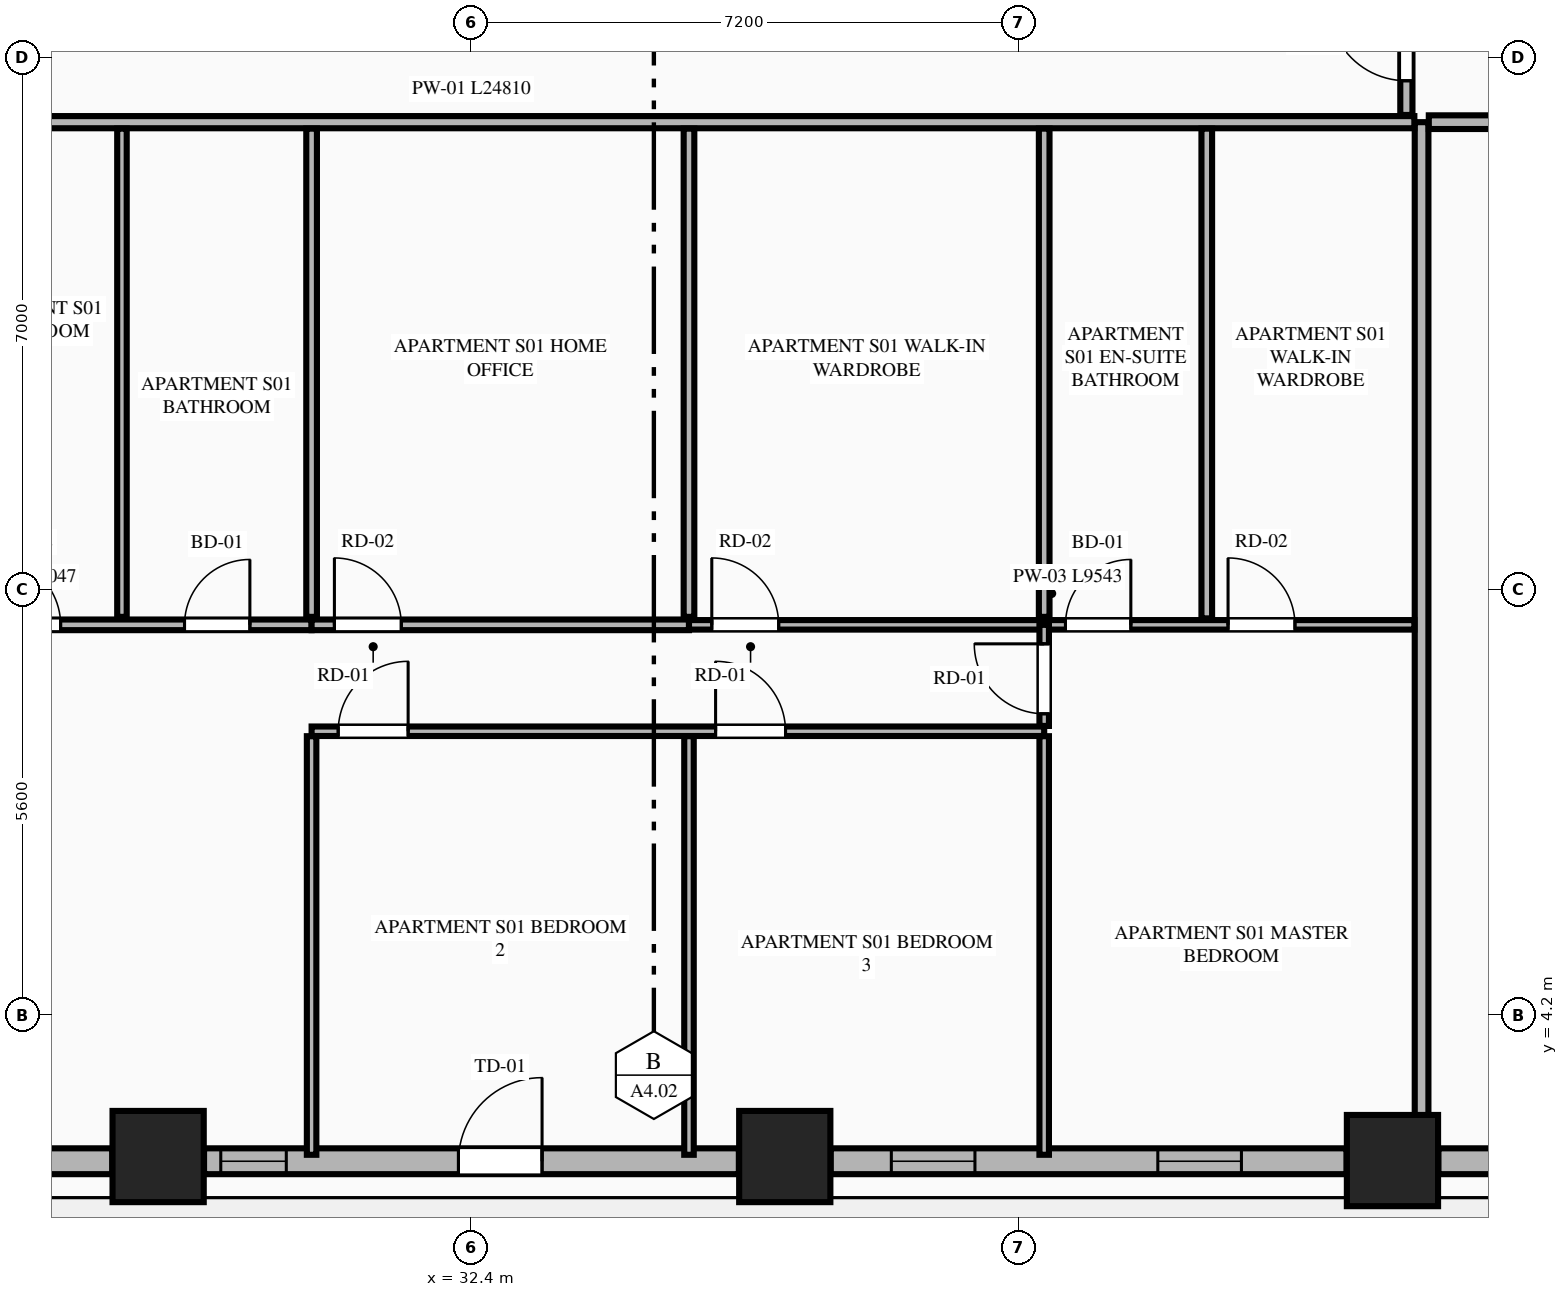
"""IFC4 building model, lengths in metres.
Left out: names, types, materials, properties, quantities, classifications, styles, units other than length and angle.
Written with IfcOpenShell. Run it as: python <this file> out.ifc"""

import sys

from ifc_helpers import new_model, si_unit, direction, frame, frame_2d, origin, origin_2d, place, context, subcontext, project, spatial, rectangle, extrude, element, fill, save


model = new_model("IFC4")
c1 = context("Model", 3, precision=1e-05, world=origin(), true_north=direction((0.0, 1.0)))
c2 = subcontext(c1, "Body", "Model", "MODEL_VIEW")
j1 = project(units=[si_unit("LENGTHUNIT", "METRE"), si_unit("PLANEANGLEUNIT", "RADIAN")], contexts=[c1])
p1 = place(None, origin())
s1 = spatial("IfcSite", under=j1, at=p1, CompositionType="ELEMENT")
p2 = place(p1, origin())
s2 = spatial("IfcBuilding", under=s1, at=p2, CompositionType="ELEMENT")
p3 = place(p2, frame((0.0, 0.0, 71.05)))
s3 = spatial("IfcBuildingStorey", under=s2, at=p3, CompositionType="ELEMENT", Elevation=71.05)
for number, where, z_axis, x_axis in (
    (1, (28.278, 2.342, 0.0), (0.0, 0.0, 1.0), (1.0, 0.0, 0.0)),
    (2, (36.522, 2.342, 0.0), (0.0, 0.0, 1.0), (1.0, 0.0, 0.0)),
    (3, (44.517, 2.289, 0.0), (0.0, 0.0, 1.0), (1.0, 0.0, 0.0)),
):
    element("IfcColumn", number, at=place(p3, frame(where, z_axis=z_axis, x_axis=x_axis)), inside=s3, PredefinedType="COLUMN", context=c2, shape_type="SweptSolid", body=[
        extrude(rectangle(XDim=1.2, YDim=1.2, at=origin_2d()), origin(), (0.0, 0.0, 1.0), 3.55),
    ])
p4 = place(p3, frame((20.887, 2.28, 0.0), z_axis=(0.0, 0.0, 1.0), x_axis=(1.0, 0.0, 0.0)))
e4 = element("IfcWall", 4, at=p4, inside=s3, PredefinedType="STANDARD", context=c2, shape_type="SweptSolid", body=[
    extrude(rectangle(XDim=6.787, YDim=0.34, at=frame_2d((3.394, 0.0))), origin(), (0.0, 0.0, 1.0), 2.652),
])
p5 = place(p4, frame((2.843, 0.0, 0.75)))
e5 = element("IfcOpeningElement", 5, at=p5, cuts=e4, PredefinedType="OPENING", context=c2, shape_type="SweptSolid", body=[
    extrude(rectangle(XDim=1.1, YDim=1.752, at=frame_2d((0.55, 0.876))), frame((0.0, 0.18, 0.0), z_axis=(0.0, -1.0, 0.0), x_axis=(1.0, 0.0, 0.0)), (0.0, 0.0, 1.0), 0.36),
])
p6 = place(p3, frame((28.882, 2.28, 0.0), z_axis=(0.0, 0.0, 1.0), x_axis=(1.0, 0.0, 0.0)))
e6 = element("IfcWall", 6, at=p6, inside=s3, PredefinedType="STANDARD", context=c2, shape_type="SweptSolid", body=[
    extrude(rectangle(XDim=7.036, YDim=0.34, at=frame_2d((3.518, 0.0))), origin(), (0.0, 0.0, 1.0), 2.652),
])
p7 = place(p6, frame((3.347, 0.0, 0.0)))
e7 = element("IfcOpeningElement", 7, at=p7, cuts=e6, PredefinedType="OPENING", context=c2, shape_type="SweptSolid", body=[
    extrude(rectangle(XDim=1.1, YDim=2.25, at=frame_2d((0.55, 1.125))), frame((0.0, 0.18, 0.0), z_axis=(0.0, -1.0, 0.0), x_axis=(1.0, 0.0, 0.0)), (0.0, 0.0, 1.0), 0.36),
])
p8 = place(p6, frame((0.22, 0.0, 0.75)))
e8 = element("IfcOpeningElement", 8, at=p8, cuts=e6, PredefinedType="OPENING", context=c2, shape_type="SweptSolid", body=[
    extrude(rectangle(XDim=0.862, YDim=1.752, at=frame_2d((0.431, 0.876))), frame((0.0, 0.18, 0.0), z_axis=(0.0, -1.0, 0.0), x_axis=(1.0, 0.0, 0.0)), (0.0, 0.0, 1.0), 0.36),
])
p9 = place(p3, frame((37.126, 2.28, 0.0), z_axis=(0.0, 0.0, 1.0), x_axis=(1.0, 0.0, 0.0)))
e9 = element("IfcWall", 9, at=p9, inside=s3, PredefinedType="STANDARD", context=c2, shape_type="SweptSolid", body=[
    extrude(rectangle(XDim=6.787, YDim=0.34, at=frame_2d((3.394, 0.0))), origin(), (0.0, 0.0, 1.0), 2.652),
])
p10 = place(p9, frame((0.798, 0.0, 0.75)))
e10 = element("IfcOpeningElement", 10, at=p10, cuts=e9, PredefinedType="OPENING", context=c2, shape_type="SweptSolid", body=[
    extrude(rectangle(XDim=1.1, YDim=1.752, at=frame_2d((0.55, 0.876))), frame((0.0, 0.18, 0.0), z_axis=(0.0, -1.0, 0.0), x_axis=(1.0, 0.0, 0.0)), (0.0, 0.0, 1.0), 0.36),
])
p11 = place(p9, frame((4.304, 0.0, 0.75)))
e11 = element("IfcOpeningElement", 11, at=p11, cuts=e9, PredefinedType="OPENING", context=c2, shape_type="SweptSolid", body=[
    extrude(rectangle(XDim=1.1, YDim=1.752, at=frame_2d((0.55, 0.876))), frame((0.0, 0.18, 0.0), z_axis=(0.0, -1.0, 0.0), x_axis=(1.0, 0.0, 0.0)), (0.0, 0.0, 1.0), 0.36),
])
p12 = place(p3, frame((45.121, 2.28, 0.0), z_axis=(0.0, 0.0, 1.0), x_axis=(1.0, 0.0, 0.0)))
e12 = element("IfcWall", 12, at=p12, inside=s3, PredefinedType="STANDARD", context=c2, shape_type="SweptSolid", body=[
    extrude(rectangle(XDim=1.245, YDim=0.34, at=frame_2d((0.623, 0.0))), origin(), (0.0, 0.0, 1.0), 3.27),
])
p13 = place(p3, frame((44.9, 2.455, 0.0), z_axis=(0.0, 0.0, 1.0), x_axis=(0.0, 1.0, 0.0)))
e13 = element("IfcWall", 13, at=p13, inside=s3, PredefinedType="PARTITIONING", context=c2, shape_type="SweptSolid", body=[
    extrude(rectangle(XDim=13.495, YDim=0.18, at=frame_2d((6.748, 0.0))), origin(), (0.0, 0.0, 1.0), 3.27),
])
p14 = place(p3, frame((19.995, 15.95, 0.0), z_axis=(0.0, 0.0, 1.0), x_axis=(1.0, 0.0, 0.0)))
e14 = element("IfcWall", 14, at=p14, inside=s3, PredefinedType="PARTITIONING", context=c2, shape_type="SweptSolid", body=[
    extrude(rectangle(XDim=24.81, YDim=0.16, at=frame_2d((12.405, 0.0))), origin(), (0.0, 0.0, 1.0), 3.27),
])
p15 = place(p14, frame((0.705, 0.0, 0.0)))
e15 = element("IfcOpeningElement", 15, at=p15, cuts=e14, PredefinedType="OPENING", context=c2, shape_type="SweptSolid", body=[
    extrude(rectangle(XDim=1.35, YDim=2.35, at=frame_2d((0.675, 1.175))), frame((0.0, 0.09, 0.0), z_axis=(0.0, -1.0, 0.0), x_axis=(1.0, 0.0, 0.0)), (0.0, 0.0, 1.0), 0.18),
])
p16 = place(p3, frame((22.25, 9.337, 0.0), z_axis=(0.0, 0.0, 1.0), x_axis=(1.0, 0.0, 0.0)))
e16 = element("IfcWall", 16, at=p16, inside=s3, PredefinedType="PLUMBINGWALL", context=c2, shape_type="SweptSolid", body=[
    extrude(rectangle(XDim=8.047, YDim=0.14, at=frame_2d((4.023, 0.0))), origin(), (0.0, 0.0, 1.0), 3.27),
])
p17 = place(p16, frame((6.375, 0.0, 0.0)))
e17 = element("IfcOpeningElement", 17, at=p17, cuts=e16, PredefinedType="OPENING", context=c2, shape_type="SweptSolid", body=[
    extrude(rectangle(XDim=0.86, YDim=2.1, at=frame_2d((0.43, 1.05))), frame((0.0, 0.08, 0.0), z_axis=(0.0, -1.0, 0.0), x_axis=(1.0, 0.0, 0.0)), (0.0, 0.0, 1.0), 0.16),
])
p18 = place(p16, frame((0.26, 0.0, 0.0)))
e18 = element("IfcOpeningElement", 18, at=p18, cuts=e16, PredefinedType="OPENING", context=c2, shape_type="SweptSolid", body=[
    extrude(rectangle(XDim=0.88, YDim=2.15, at=frame_2d((0.44, 1.075))), frame((0.0, 0.08, 0.0), z_axis=(0.0, -1.0, 0.0), x_axis=(1.0, 0.0, 0.0)), (0.0, 0.0, 1.0), 0.16),
])
p19 = place(p16, frame((3.865, 0.0, 0.0)))
e19 = element("IfcOpeningElement", 19, at=p19, cuts=e16, PredefinedType="OPENING", context=c2, shape_type="SweptSolid", body=[
    extrude(rectangle(XDim=0.88, YDim=2.15, at=frame_2d((0.44, 1.075))), frame((0.0, 0.08, 0.0), z_axis=(0.0, -1.0, 0.0), x_axis=(1.0, 0.0, 0.0)), (0.0, 0.0, 1.0), 0.16),
])
p20 = place(p3, frame((30.297, 9.337, 0.0), z_axis=(0.0, 0.0, 1.0), x_axis=(1.0, 0.0, 0.0)))
e20 = element("IfcWall", 20, at=p20, inside=s3, PredefinedType="PLUMBINGWALL", context=c2, shape_type="SweptSolid", body=[
    extrude(rectangle(XDim=4.965, YDim=0.14, at=frame_2d((2.482, 0.0))), origin(), (0.0, 0.0, 1.0), 3.27),
])
p21 = place(p20, frame((0.3, 0.0, 0.0)))
e21 = element("IfcOpeningElement", 21, at=p21, cuts=e20, PredefinedType="OPENING", context=c2, shape_type="SweptSolid", body=[
    extrude(rectangle(XDim=0.88, YDim=2.15, at=frame_2d((0.44, 1.075))), frame((0.0, 0.08, 0.0), z_axis=(0.0, -1.0, 0.0), x_axis=(1.0, 0.0, 0.0)), (0.0, 0.0, 1.0), 0.16),
])
p22 = place(p3, frame((35.262, 9.337, 0.0), z_axis=(0.0, 0.0, 1.0), x_axis=(1.0, 0.0, 0.0)))
e22 = element("IfcWall", 22, at=p22, inside=s3, PredefinedType="PARTITIONING", context=c2, shape_type="SweptSolid", body=[
    extrude(rectangle(XDim=9.543, YDim=0.125, at=frame_2d((4.771, 0.0))), origin(), (0.0, 0.0, 1.0), 3.27),
])
p23 = place(p22, frame((4.953, 0.0, 0.0)))
e23 = element("IfcOpeningElement", 23, at=p23, cuts=e22, PredefinedType="OPENING", context=c2, shape_type="SweptSolid", body=[
    extrude(rectangle(XDim=0.86, YDim=2.1, at=frame_2d((0.43, 1.05))), frame((0.0, 0.073, 0.0), z_axis=(0.0, -1.0, 0.0), x_axis=(1.0, 0.0, 0.0)), (0.0, 0.0, 1.0), 0.145),
])
p24 = place(p22, frame((7.092, 0.0, 0.0)))
e24 = element("IfcOpeningElement", 24, at=p24, cuts=e22, PredefinedType="OPENING", context=c2, shape_type="SweptSolid", body=[
    extrude(rectangle(XDim=0.88, YDim=2.15, at=frame_2d((0.44, 1.075))), frame((0.0, 0.073, 0.0), z_axis=(0.0, -1.0, 0.0), x_axis=(1.0, 0.0, 0.0)), (0.0, 0.0, 1.0), 0.145),
])
p25 = place(p22, frame((0.3, 0.0, 0.0)))
e25 = element("IfcOpeningElement", 25, at=p25, cuts=e22, PredefinedType="OPENING", context=c2, shape_type="SweptSolid", body=[
    extrude(rectangle(XDim=0.88, YDim=2.15, at=frame_2d((0.44, 1.075))), frame((0.0, 0.073, 0.0), z_axis=(0.0, -1.0, 0.0), x_axis=(1.0, 0.0, 0.0)), (0.0, 0.0, 1.0), 0.145),
])
p26 = place(p3, frame((27.802, 9.442, 0.0), z_axis=(0.0, 0.0, 1.0), x_axis=(0.0, 1.0, 0.0)))
e26 = element("IfcWall", 26, at=p26, inside=s3, PredefinedType="PARTITIONING", context=c2, shape_type="SweptSolid", body=[
    extrude(rectangle(XDim=6.423, YDim=0.125, at=frame_2d((3.211, 0.0))), origin(), (0.0, 0.0, 1.0), 3.27),
])
p27 = place(p3, frame((30.297, 2.365, 0.0), z_axis=(0.0, 0.0, 1.0), x_axis=(0.0, 1.0, 0.0)))
e27 = element("IfcWall", 27, at=p27, inside=s3, PredefinedType="PARTITIONING", context=c2, shape_type="SweptSolid", body=[
    extrude(rectangle(XDim=5.507, YDim=0.125, at=frame_2d((2.753, 0.0))), origin(), (0.0, 0.0, 1.0), 3.27),
])
p28 = place(p3, frame((30.297, 7.937, 0.0), z_axis=(0.0, 0.0, 1.0), x_axis=(1.0, 0.0, 0.0)))
e28 = element("IfcWall", 28, at=p28, inside=s3, PredefinedType="PARTITIONING", context=c2, shape_type="SweptSolid", body=[
    extrude(rectangle(XDim=9.638, YDim=0.125, at=frame_2d((4.819, 0.0))), origin(), (0.0, 0.0, 1.0), 3.27),
])
p29 = place(p28, frame((0.35, 0.0, 0.0)))
e29 = element("IfcOpeningElement", 29, at=p29, cuts=e28, PredefinedType="OPENING", context=c2, shape_type="SweptSolid", body=[
    extrude(rectangle(XDim=0.92, YDim=2.15, at=frame_2d((0.46, 1.075))), frame((0.0, 0.073, 0.0), z_axis=(0.0, -1.0, 0.0), x_axis=(1.0, 0.0, 0.0)), (0.0, 0.0, 1.0), 0.145),
])
p30 = place(p28, frame((5.315, 0.0, 0.0)))
e30 = element("IfcOpeningElement", 30, at=p30, cuts=e28, PredefinedType="OPENING", context=c2, shape_type="SweptSolid", body=[
    extrude(rectangle(XDim=0.92, YDim=2.15, at=frame_2d((0.46, 1.075))), frame((0.0, 0.073, 0.0), z_axis=(0.0, -1.0, 0.0), x_axis=(1.0, 0.0, 0.0)), (0.0, 0.0, 1.0), 0.145),
])
p31 = place(p3, frame((39.935, 8.007, 0.0), z_axis=(0.0, 0.0, 1.0), x_axis=(0.0, 1.0, 0.0)))
e31 = element("IfcWall", 31, at=p31, inside=s3, PredefinedType="PARTITIONING", context=c2, shape_type="SweptSolid", body=[
    extrude(rectangle(XDim=1.33, YDim=0.125, at=frame_2d((0.665, 0.0))), origin(), (0.0, 0.0, 1.0), 3.27),
])
p32 = place(p31, frame((0.16, 0.0, 0.0)))
e32 = element("IfcOpeningElement", 32, at=p32, cuts=e31, PredefinedType="OPENING", context=c2, shape_type="SweptSolid", body=[
    extrude(rectangle(XDim=0.92, YDim=2.15, at=frame_2d((0.46, 1.075))), frame((0.0, 0.073, 0.0), z_axis=(0.0, -1.0, 0.0), x_axis=(1.0, 0.0, 0.0)), (0.0, 0.0, 1.0), 0.145),
])
for number, where, z_axis, x_axis in (
    (33, (30.297, 9.442, 0.0), (0.0, 0.0, 1.0), (0.0, 1.0, 0.0)),
    (34, (35.262, 9.442, 0.0), (0.0, 0.0, 1.0), (0.0, 1.0, 0.0)),
):
    element("IfcWall", number, at=place(p3, frame(where, z_axis=z_axis, x_axis=x_axis)), inside=s3, PredefinedType="PLUMBINGWALL", context=c2, shape_type="SweptSolid", body=[
        extrude(rectangle(XDim=6.423, YDim=0.14, at=frame_2d((3.211, 0.0))), origin(), (0.0, 0.0, 1.0), 3.27),
    ])
for number, where, z_axis, x_axis in (
    (35, (35.262, 2.365, 0.0), (0.0, 0.0, 1.0), (0.0, 1.0, 0.0)),
    (36, (39.935, 2.365, 0.0), (0.0, 0.0, 1.0), (0.0, 1.0, 0.0)),
):
    element("IfcWall", number, at=place(p3, frame(where, z_axis=z_axis, x_axis=x_axis)), inside=s3, PredefinedType="PARTITIONING", context=c2, shape_type="SweptSolid", body=[
        extrude(rectangle(XDim=5.507, YDim=0.125, at=frame_2d((2.753, 0.0))), origin(), (0.0, 0.0, 1.0), 3.27),
    ])
p33 = place(p3, frame((39.935, 9.442, 0.0), z_axis=(0.0, 0.0, 1.0), x_axis=(0.0, 1.0, 0.0)))
e37 = element("IfcWall", 37, at=p33, inside=s3, PredefinedType="PLUMBINGWALL", context=c2, shape_type="SweptSolid", body=[
    extrude(rectangle(XDim=6.423, YDim=0.14, at=frame_2d((3.211, 0.0))), origin(), (0.0, 0.0, 1.0), 3.27),
])
p34 = place(p3, frame((42.074, 9.422, 0.0), z_axis=(0.0, 0.0, 1.0), x_axis=(0.0, 1.0, 0.0)))
e38 = element("IfcWall", 38, at=p34, inside=s3, PredefinedType="PLUMBINGWALL", context=c2, shape_type="SweptSolid", body=[
    extrude(rectangle(XDim=6.443, YDim=0.14, at=frame_2d((3.221, 0.0))), origin(), (0.0, 0.0, 1.0), 2.64),
])
p35 = place(p3, frame((44.995, 15.95, 0.0), z_axis=(0.0, 0.0, 1.0), x_axis=(1.0, 0.0, 0.0)))
e39 = element("IfcWall", 39, at=p35, inside=s3, PredefinedType="PARTITIONING", context=c2, shape_type="SweptSolid", body=[
    extrude(rectangle(XDim=9.241, YDim=0.18, at=frame_2d((4.621, 0.0))), origin(), (0.0, 0.0, 1.0), 3.27),
])
p36 = place(p3, frame((44.7, 16.045, 0.0), z_axis=(0.0, 0.0, 1.0), x_axis=(0.0, 1.0, 0.0)))
e40 = element("IfcWall", 40, at=p36, inside=s3, PredefinedType="PARTITIONING", context=c2, shape_type="SweptSolid", body=[
    extrude(rectangle(XDim=8.765, YDim=0.16, at=frame_2d((4.383, 0.0))), origin(), (0.0, 0.0, 1.0), 2.64),
])
p37 = place(p36, frame((0.45, 0.0, 0.0)))
e41 = element("IfcOpeningElement", 41, at=p37, cuts=e40, PredefinedType="OPENING", context=c2, shape_type="SweptSolid", body=[
    extrude(rectangle(XDim=1.02, YDim=2.25, at=frame_2d((0.51, 1.125))), frame((0.0, 0.09, 0.0), z_axis=(0.0, -1.0, 0.0), x_axis=(1.0, 0.0, 0.0)), (0.0, 0.0, 1.0), 0.18),
])
p38 = place(p7, origin())
e42 = element("IfcDoor", 42, at=p38, inside=s3, OperationType="SINGLE_SWING_RIGHT", PredefinedType="DOOR", context=c2, shape_type="SweptSolid", body=[
    extrude(rectangle(XDim=1.1, YDim=2.25, at=frame_2d((0.55, 1.125))), frame((0.0, 0.025, 0.0), z_axis=(0.0, -1.0, 0.0), x_axis=(1.0, 0.0, 0.0)), (0.0, 0.0, 1.0), 0.05),
])
fill(e7, e42)
p39 = place(p10, origin())
e43 = element("IfcWindow", 43, at=p39, inside=s3, PartitioningType="SINGLE_PANEL", PredefinedType="WINDOW", context=c2, shape_type="SweptSolid", body=[
    extrude(rectangle(XDim=1.1, YDim=1.752, at=frame_2d((0.55, 0.876))), frame((0.0, 0.03, 0.0), z_axis=(0.0, -1.0, 0.0), x_axis=(1.0, 0.0, 0.0)), (0.0, 0.0, 1.0), 0.06),
])
fill(e10, e43)
p40 = place(p17, origin())
e44 = element("IfcDoor", 44, at=p40, inside=s3, OperationType="SINGLE_SWING_RIGHT", PredefinedType="DOOR", context=c2, shape_type="SweptSolid", body=[
    extrude(rectangle(XDim=0.86, YDim=2.1, at=frame_2d((0.43, 1.05))), frame((0.0, 0.025, 0.0), z_axis=(0.0, -1.0, 0.0), x_axis=(1.0, 0.0, 0.0)), (0.0, 0.0, 1.0), 0.05),
])
fill(e17, e44)
p41 = place(p23, origin())
e45 = element("IfcDoor", 45, at=p41, inside=s3, OperationType="SINGLE_SWING_RIGHT", PredefinedType="DOOR", context=c2, shape_type="SweptSolid", body=[
    extrude(rectangle(XDim=0.86, YDim=2.1, at=frame_2d((0.43, 1.05))), frame((0.0, 0.025, 0.0), z_axis=(0.0, -1.0, 0.0), x_axis=(1.0, 0.0, 0.0)), (0.0, 0.0, 1.0), 0.05),
])
fill(e23, e45)
p42 = place(p24, origin())
e46 = element("IfcDoor", 46, at=p42, inside=s3, OperationType="SINGLE_SWING_LEFT", PredefinedType="DOOR", context=c2, shape_type="SweptSolid", body=[
    extrude(rectangle(XDim=0.88, YDim=2.15, at=frame_2d((0.44, 1.075))), frame((0.0, 0.025, 0.0), z_axis=(0.0, -1.0, 0.0), x_axis=(1.0, 0.0, 0.0)), (0.0, 0.0, 1.0), 0.05),
])
fill(e24, e46)
p43 = place(p19, origin())
e47 = element("IfcDoor", 47, at=p43, inside=s3, OperationType="SINGLE_SWING_LEFT", PredefinedType="DOOR", context=c2, shape_type="SweptSolid", body=[
    extrude(rectangle(XDim=0.88, YDim=2.15, at=frame_2d((0.44, 1.075))), frame((0.0, 0.025, 0.0), z_axis=(0.0, -1.0, 0.0), x_axis=(1.0, 0.0, 0.0)), (0.0, 0.0, 1.0), 0.05),
])
fill(e19, e47)
p44 = place(p21, origin())
e48 = element("IfcDoor", 48, at=p44, inside=s3, OperationType="SINGLE_SWING_LEFT", PredefinedType="DOOR", context=c2, shape_type="SweptSolid", body=[
    extrude(rectangle(XDim=0.88, YDim=2.15, at=frame_2d((0.44, 1.075))), frame((0.0, 0.025, 0.0), z_axis=(0.0, -1.0, 0.0), x_axis=(1.0, 0.0, 0.0)), (0.0, 0.0, 1.0), 0.05),
])
fill(e21, e48)
p45 = place(p29, origin())
e49 = element("IfcDoor", 49, at=p45, inside=s3, OperationType="SINGLE_SWING_RIGHT", PredefinedType="DOOR", context=c2, shape_type="SweptSolid", body=[
    extrude(rectangle(XDim=0.92, YDim=2.15, at=frame_2d((0.46, 1.075))), frame((0.0, 0.025, 0.0), z_axis=(0.0, -1.0, 0.0), x_axis=(1.0, 0.0, 0.0)), (0.0, 0.0, 1.0), 0.05),
])
fill(e29, e49)
p46 = place(p30, origin())
e50 = element("IfcDoor", 50, at=p46, inside=s3, OperationType="SINGLE_SWING_LEFT", PredefinedType="DOOR", context=c2, shape_type="SweptSolid", body=[
    extrude(rectangle(XDim=0.92, YDim=2.15, at=frame_2d((0.46, 1.075))), frame((0.0, 0.025, 0.0), z_axis=(0.0, -1.0, 0.0), x_axis=(1.0, 0.0, 0.0)), (0.0, 0.0, 1.0), 0.05),
])
fill(e30, e50)
p47 = place(p32, origin())
e51 = element("IfcDoor", 51, at=p47, inside=s3, OperationType="SINGLE_SWING_RIGHT", PredefinedType="DOOR", context=c2, shape_type="SweptSolid", body=[
    extrude(rectangle(XDim=0.92, YDim=2.15, at=frame_2d((0.46, 1.075))), frame((0.0, 0.025, 0.0), z_axis=(0.0, -1.0, 0.0), x_axis=(1.0, 0.0, 0.0)), (0.0, 0.0, 1.0), 0.05),
])
fill(e32, e51)
p48 = place(p25, origin())
e52 = element("IfcDoor", 52, at=p48, inside=s3, OperationType="SINGLE_SWING_LEFT", PredefinedType="DOOR", context=c2, shape_type="SweptSolid", body=[
    extrude(rectangle(XDim=0.88, YDim=2.15, at=frame_2d((0.44, 1.075))), frame((0.0, 0.025, 0.0), z_axis=(0.0, -1.0, 0.0), x_axis=(1.0, 0.0, 0.0)), (0.0, 0.0, 1.0), 0.05),
])
fill(e25, e52)
p49 = place(p37, origin())
e53 = element("IfcDoor", 53, at=p49, inside=s3, OperationType="SINGLE_SWING_RIGHT", PredefinedType="DOOR", context=c2, shape_type="SweptSolid", body=[
    extrude(rectangle(XDim=1.02, YDim=2.25, at=frame_2d((0.51, 1.125))), frame((0.0, 0.025, 0.0), z_axis=(0.0, -1.0, 0.0), x_axis=(1.0, 0.0, 0.0)), (0.0, 0.0, 1.0), 0.05),
])
fill(e41, e53)
p50 = place(p8, origin())
e54 = element("IfcWindow", 54, at=p50, inside=s3, PartitioningType="SINGLE_PANEL", PredefinedType="WINDOW", context=c2, shape_type="SweptSolid", body=[
    extrude(rectangle(XDim=0.862, YDim=1.752, at=frame_2d((0.431, 0.876))), frame((0.0, 0.03, 0.0), z_axis=(0.0, -1.0, 0.0), x_axis=(1.0, 0.0, 0.0)), (0.0, 0.0, 1.0), 0.06),
])
fill(e8, e54)
p51 = place(p11, origin())
e55 = element("IfcWindow", 55, at=p51, inside=s3, PartitioningType="SINGLE_PANEL", PredefinedType="WINDOW", context=c2, shape_type="SweptSolid", body=[
    extrude(rectangle(XDim=1.1, YDim=1.752, at=frame_2d((0.55, 0.876))), frame((0.0, 0.03, 0.0), z_axis=(0.0, -1.0, 0.0), x_axis=(1.0, 0.0, 0.0)), (0.0, 0.0, 1.0), 0.06),
])
fill(e11, e55)
save(model, sys.argv[1])
